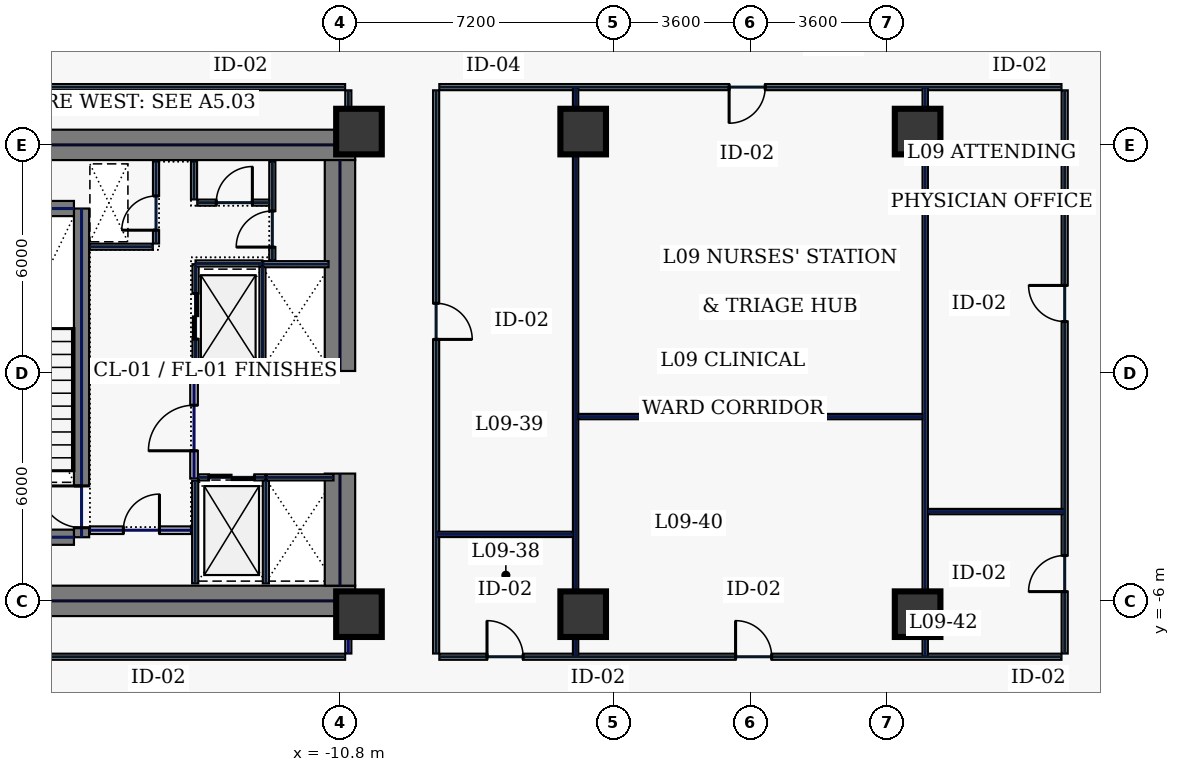
"""IFC4 building model, lengths in metres.
Left out: names, types, materials, properties, quantities, classifications, styles, units other than length and angle.
Written with IfcOpenShell. Run it as: python <this file> out.ifc"""

import sys

from ifc_helpers import new_model, si_unit, direction, frame, frame_2d, origin, origin_2d, place, context, subcontext, project, spatial, rectangle, hollow_rectangle, extrude, element, fill, save


model = new_model("IFC4")
c1 = context("Model", 3, precision=1e-05, world=origin(), true_north=direction((0.0, 1.0)))
c2 = subcontext(c1, "Body", "Model", "MODEL_VIEW")
j1 = project(units=[si_unit("LENGTHUNIT", "METRE"), si_unit("PLANEANGLEUNIT", "RADIAN")], contexts=[c1])
p1 = place(None, origin())
s1 = spatial("IfcSite", under=j1, at=p1, CompositionType="ELEMENT")
p2 = place(p1, origin())
s2 = spatial("IfcBuilding", under=s1, at=p2, CompositionType="ELEMENT")
p3 = place(p2, frame((0.0, 0.0, 47.4)))
s3 = spatial("IfcBuildingStorey", under=s2, at=p3, CompositionType="ELEMENT", Elevation=47.4)
for number, where, z_axis, x_axis in (
    (1, (-22.0, 6.0, 0.0), (0.0, 0.0, 1.0), (1.0, 0.0, 0.0)),
    (2, (-22.0, -6.0, 0.0), (0.0, 0.0, 1.0), (1.0, 0.0, 0.0)),
):
    element("IfcWall", number, at=place(p3, frame(where, z_axis=z_axis, x_axis=x_axis)), inside=s3, PredefinedType="SHEAR", context=c2, shape_type="SweptSolid", body=[
        extrude(rectangle(XDim=11.6, YDim=0.8, at=frame_2d((5.8, 0.0))), origin(), (0.0, 0.0, 1.0), 3.74),
    ])
p4 = place(p3, frame((-10.8, -5.6, 0.0), z_axis=(0.0, 0.0, 1.0), x_axis=(0.0, 1.0, 0.0)))
e3 = element("IfcWall", 3, at=p4, inside=s3, PredefinedType="SHEAR", context=c2, shape_type="SweptSolid", body=[
    extrude(rectangle(XDim=2.95, YDim=0.8, at=frame_2d((1.475, 0.0))), origin(), (0.0, 0.0, 1.0), 3.74),
])
p5 = place(p3, frame((-10.8, 0.05, 0.0), z_axis=(0.0, 0.0, 1.0), x_axis=(0.0, 1.0, 0.0)))
e4 = element("IfcWall", 4, at=p5, inside=s3, PredefinedType="SHEAR", context=c2, shape_type="SweptSolid", body=[
    extrude(rectangle(XDim=5.55, YDim=0.8, at=frame_2d((2.775, 0.0))), origin(), (0.0, 0.0, 1.0), 3.74),
])
p6 = place(p3, frame((-17.6, -4.325, 0.0), z_axis=(0.0, 0.0, 1.0), x_axis=(0.0, 1.0, 0.0)))
e5 = element("IfcWall", 5, at=p6, inside=s3, PredefinedType="SHEAR", context=c2, shape_type="SweptSolid", body=[
    extrude(rectangle(XDim=8.65, YDim=0.4, at=frame_2d((4.325, 0.0))), origin(), (0.0, 0.0, 1.0), 3.74),
])
p7 = place(p6, frame((0.25, 0.0, 0.0)))
e6 = element("IfcOpeningElement", 6, at=p7, cuts=e5, PredefinedType="OPENING", context=c2, shape_type="SweptSolid", body=[
    extrude(rectangle(XDim=1.1, YDim=2.2, at=frame_2d((0.55, 1.1))), frame((0.0, 0.21, 0.0), z_axis=(0.0, -1.0, 0.0), x_axis=(1.0, 0.0, 0.0)), (0.0, 0.0, 1.0), 0.42),
])
for number, where, z_axis, x_axis in (
    (7, (-21.2, -4.325, 0.0), (0.0, 0.0, 1.0), (1.0, 0.0, 0.0)),
    (8, (-21.2, 4.325, 0.0), (0.0, 0.0, 1.0), (1.0, 0.0, 0.0)),
):
    element("IfcWall", number, at=place(p3, frame(where, z_axis=z_axis, x_axis=x_axis)), inside=s3, PredefinedType="SHEAR", context=c2, shape_type="SweptSolid", body=[
        extrude(rectangle(XDim=3.4, YDim=0.4, at=frame_2d((1.7, 0.0))), origin(), (0.0, 0.0, 1.0), 3.74),
    ])
for number, where, z_axis, x_axis in (
    (9, (-10.3, -6.35, 0.0), (0.0, 0.0, 1.0), (1.0, 0.0, 0.0)),
    (10, (-10.3, 6.35, 0.0), (0.0, 0.0, 1.0), (1.0, 0.0, 0.0)),
    (11, (-4.4, -6.35, 0.0), (0.0, 0.0, 1.0), (1.0, 0.0, 0.0)),
    (12, (4.4, -6.35, 0.0), (0.0, 0.0, 1.0), (1.0, 0.0, 0.0)),
    (13, (-4.4, 6.35, 0.0), (0.0, 0.0, 1.0), (1.0, 0.0, 0.0)),
    (14, (4.4, 6.35, 0.0), (0.0, 0.0, 1.0), (1.0, 0.0, 0.0)),
):
    element("IfcColumn", number, at=place(p3, frame(where, z_axis=z_axis, x_axis=x_axis)), inside=s3, PredefinedType="COLUMN", context=c2, shape_type="SweptSolid", body=[
        extrude(hollow_rectangle(XDim=1.2, YDim=1.2, WallThickness=0.05, at=origin_2d()), origin(), (0.0, 0.0, 1.0), 3.74),
    ])
p8 = place(p3, frame((-14.6, 0.12, 0.0), z_axis=(0.0, 0.0, 1.0), x_axis=(0.0, 1.0, 0.0)))
e15 = element("IfcWall", 15, at=p8, inside=s3, PredefinedType="PARTITIONING", context=c2, shape_type="SweptSolid", body=[
    extrude(rectangle(XDim=2.74, YDim=0.16, at=frame_2d((1.37, 0.0))), origin(), (0.0, 0.0, 1.0), 3.74),
])
p9 = place(p8, frame((0.77, 0.0, 0.0)))
e16 = element("IfcOpeningElement", 16, at=p9, cuts=e15, PredefinedType="OPENING", context=c2, shape_type="SweptSolid", body=[
    extrude(rectangle(XDim=1.2, YDim=2.2, at=frame_2d((0.6, 1.1))), frame((0.0, 0.09, 0.0), z_axis=(0.0, -1.0, 0.0), x_axis=(1.0, 0.0, 0.0)), (0.0, 0.0, 1.0), 0.18),
])
for number, where, z_axis, x_axis in (
    (17, (-14.6, 0.1, 0.0), (0.0, 0.0, 1.0), (1.0, 0.0, 0.0)),
    (18, (-14.6, 2.88, 0.0), (0.0, 0.0, 1.0), (1.0, 0.0, 0.0)),
):
    element("IfcWall", number, at=place(p3, frame(where, z_axis=z_axis, x_axis=x_axis)), inside=s3, PredefinedType="PARTITIONING", context=c2, shape_type="SweptSolid", body=[
        extrude(rectangle(XDim=1.76, YDim=0.16, at=frame_2d((0.88, 0.0))), origin(), (0.0, 0.0, 1.0), 3.74),
    ])
p10 = place(p3, frame((-12.84, 0.18, 0.0), z_axis=(0.0, 0.0, 1.0), x_axis=(0.0, 1.0, 0.0)))
e19 = element("IfcWall", 19, at=p10, inside=s3, PredefinedType="PARTITIONING", context=c2, shape_type="SweptSolid", body=[
    extrude(rectangle(XDim=2.62, YDim=0.16, at=frame_2d((1.31, 0.0))), origin(), (0.0, 0.0, 1.0), 3.74),
])
p11 = place(p3, frame((-14.53, -2.75, 0.0), z_axis=(0.0, 0.0, 1.0), x_axis=(1.0, 0.0, 0.0)))
e20 = element("IfcWall", 20, at=p11, inside=s3, PredefinedType="PARTITIONING", context=c2, shape_type="SweptSolid", body=[
    extrude(rectangle(XDim=1.76, YDim=0.16, at=frame_2d((0.88, 0.0))), origin(), (0.0, 0.0, 1.0), 3.74),
])
p12 = place(p11, frame((0.28, 0.0, 0.0)))
e21 = element("IfcOpeningElement", 21, at=p12, cuts=e20, PredefinedType="OPENING", context=c2, shape_type="SweptSolid", body=[
    extrude(rectangle(XDim=1.2, YDim=2.2, at=frame_2d((0.6, 1.1))), frame((0.0, 0.09, 0.0), z_axis=(0.0, -1.0, 0.0), x_axis=(1.0, 0.0, 0.0)), (0.0, 0.0, 1.0), 0.18),
])
for number, where, z_axis, x_axis in (
    (22, (-12.75, -5.54, 0.0), (0.0, 0.0, 1.0), (0.0, 1.0, 0.0)),
    (23, (-14.61, -5.54, 0.0), (0.0, 0.0, 1.0), (0.0, 1.0, 0.0)),
):
    element("IfcWall", number, at=place(p3, frame(where, z_axis=z_axis, x_axis=x_axis)), inside=s3, PredefinedType="PARTITIONING", context=c2, shape_type="SweptSolid", body=[
        extrude(rectangle(XDim=2.7, YDim=0.16, at=frame_2d((1.35, 0.0))), origin(), (0.0, 0.0, 1.0), 3.74),
    ])
p13 = place(p3, frame((-12.73, -2.75, 0.0), z_axis=(0.0, 0.0, 1.0), x_axis=(1.0, 0.0, 0.0)))
e24 = element("IfcWall", 24, at=p13, inside=s3, PredefinedType="PARTITIONING", context=c2, shape_type="SweptSolid", body=[
    extrude(rectangle(XDim=1.76, YDim=0.16, at=frame_2d((0.88, 0.0))), origin(), (0.0, 0.0, 1.0), 3.74),
])
for number, where, z_axis, x_axis in (
    (25, (-12.82, 0.06, 0.0), (0.0, 0.0, 1.0), (1.0, 0.0, 0.0)),
    (26, (-12.82, 2.86, 0.0), (0.0, 0.0, 1.0), (1.0, 0.0, 0.0)),
):
    element("IfcWall", number, at=place(p3, frame(where, z_axis=z_axis, x_axis=x_axis)), inside=s3, PredefinedType="PARTITIONING", context=c2, shape_type="SweptSolid", body=[
        extrude(rectangle(XDim=1.72, YDim=0.16, at=frame_2d((0.86, 0.0))), origin(), (0.0, 0.0, 1.0), 3.74),
    ])
p14 = place(p3, frame((-15.64, 3.405, 0.0), z_axis=(0.0, 0.0, 1.0), x_axis=(0.0, 1.0, 0.0)))
e27 = element("IfcWall", 27, at=p14, inside=s3, PredefinedType="PARTITIONING", context=c2, shape_type="SweptSolid", body=[
    extrude(rectangle(XDim=2.155, YDim=0.16, at=frame_2d((1.078, 0.0))), origin(), (0.0, 0.0, 1.0), 3.74),
])
p15 = place(p14, frame((0.35, 0.0, 0.0)))
e28 = element("IfcOpeningElement", 28, at=p15, cuts=e27, PredefinedType="OPENING", context=c2, shape_type="SweptSolid", body=[
    extrude(rectangle(XDim=0.9, YDim=2.2, at=frame_2d((0.45, 1.1))), frame((0.0, 0.09, 0.0), z_axis=(0.0, -1.0, 0.0), x_axis=(1.0, 0.0, 0.0)), (0.0, 0.0, 1.0), 0.18),
])
p16 = place(p3, frame((-17.38, 3.32, 0.0), z_axis=(0.0, 0.0, 1.0), x_axis=(1.0, 0.0, 0.0)))
e29 = element("IfcWall", 29, at=p16, inside=s3, PredefinedType="PARTITIONING", context=c2, shape_type="SweptSolid", body=[
    extrude(rectangle(XDim=1.655, YDim=0.16, at=frame_2d((0.827, 0.0))), origin(), (0.0, 0.0, 1.0), 3.74),
])
p17 = place(p3, frame((-17.38, -4.14, 0.0), z_axis=(0.0, 0.0, 1.0), x_axis=(1.0, 0.0, 0.0)))
e30 = element("IfcWall", 30, at=p17, inside=s3, PredefinedType="SOLIDWALL", context=c2, shape_type="SweptSolid", body=[
    extrude(rectangle(XDim=2.66, YDim=0.2, at=frame_2d((1.33, 0.0))), origin(), (0.0, 0.0, 1.0), 3.74),
])
p18 = place(p17, frame((0.88, 0.0, 0.0)))
e31 = element("IfcOpeningElement", 31, at=p18, cuts=e30, PredefinedType="OPENING", context=c2, shape_type="SweptSolid", body=[
    extrude(rectangle(XDim=0.95, YDim=2.2, at=frame_2d((0.475, 1.1))), frame((0.0, 0.11, 0.0), z_axis=(0.0, -1.0, 0.0), x_axis=(1.0, 0.0, 0.0)), (0.0, 0.0, 1.0), 0.22),
])
p19 = place(p3, frame((-12.58, 2.96, 0.0), z_axis=(0.0, 0.0, 1.0), x_axis=(0.0, 1.0, 0.0)))
e32 = element("IfcWall", 32, at=p19, inside=s3, PredefinedType="PARTITIONING", context=c2, shape_type="SweptSolid", body=[
    extrude(rectangle(XDim=2.6, YDim=0.16, at=frame_2d((1.3, 0.0))), origin(), (0.0, 0.0, 1.0), 3.74),
])
p20 = place(p19, frame((0.35, 0.0, 0.0)))
e33 = element("IfcOpeningElement", 33, at=p20, cuts=e32, PredefinedType="OPENING", context=c2, shape_type="SweptSolid", body=[
    extrude(rectangle(XDim=0.95, YDim=2.2, at=frame_2d((0.475, 1.1))), frame((0.0, 0.09, 0.0), z_axis=(0.0, -1.0, 0.0), x_axis=(1.0, 0.0, 0.0)), (0.0, 0.0, 1.0), 0.18),
])
p21 = place(p3, frame((-14.555, 4.48, 0.0), z_axis=(0.0, 0.0, 1.0), x_axis=(1.0, 0.0, 0.0)))
e34 = element("IfcWall", 34, at=p21, inside=s3, PredefinedType="PARTITIONING", context=c2, shape_type="SweptSolid", body=[
    extrude(rectangle(XDim=1.89, YDim=0.16, at=frame_2d((0.945, 0.0))), origin(), (0.0, 0.0, 1.0), 3.74),
])
p22 = place(p21, frame((0.5, 0.0, 0.0)))
e35 = element("IfcOpeningElement", 35, at=p22, cuts=e34, PredefinedType="OPENING", context=c2, shape_type="SweptSolid", body=[
    extrude(rectangle(XDim=0.95, YDim=2.2, at=frame_2d((0.475, 1.1))), frame((0.0, 0.09, 0.0), z_axis=(0.0, -1.0, 0.0), x_axis=(1.0, 0.0, 0.0)), (0.0, 0.0, 1.0), 0.18),
])
p23 = place(p3, frame((-14.64, 4.565, 0.0), z_axis=(0.0, 0.0, 1.0), x_axis=(0.0, 1.0, 0.0)))
e36 = element("IfcWall", 36, at=p23, inside=s3, PredefinedType="PARTITIONING", context=c2, shape_type="SweptSolid", body=[
    extrude(rectangle(XDim=0.995, YDim=0.16, at=frame_2d((0.498, 0.0))), origin(), (0.0, 0.0, 1.0), 3.74),
])
p24 = place(p3, frame((-14.64, -2.78, 0.0), z_axis=(0.0, 0.0, 1.0), x_axis=(0.0, 1.0, 0.0)))
e37 = element("IfcWall", 37, at=p24, inside=s3, PredefinedType="SOLIDWALL", context=c2, shape_type="SweptSolid", body=[
    extrude(rectangle(XDim=2.82, YDim=0.2, at=frame_2d((1.41, 0.0))), origin(), (0.0, 0.0, 1.0), 3.74),
])
p25 = place(p24, frame((0.73, 0.0, 0.0)))
e38 = element("IfcOpeningElement", 38, at=p25, cuts=e37, PredefinedType="OPENING", context=c2, shape_type="SweptSolid", body=[
    extrude(rectangle(XDim=1.2, YDim=2.2, at=frame_2d((0.6, 1.1))), frame((0.0, 0.11, 0.0), z_axis=(0.0, -1.0, 0.0), x_axis=(1.0, 0.0, 0.0)), (0.0, 0.0, 1.0), 0.22),
])
p26 = place(p3, frame((8.185, 7.52, 0.0), z_axis=(0.0, 0.0, 1.0), x_axis=(-1.0, 0.0, 0.0)))
e39 = element("IfcWall", 39, at=p26, inside=s3, PredefinedType="PARTITIONING", context=c2, shape_type="SweptSolid", body=[
    extrude(rectangle(XDim=16.37, YDim=0.16, at=frame_2d((8.185, 0.0))), origin(), (0.0, 0.0, 1.0), 3.74),
])
p27 = place(p26, frame((7.795, 0.0, 0.0)))
e40 = element("IfcOpeningElement", 40, at=p27, cuts=e39, PredefinedType="OPENING", context=c2, shape_type="SweptSolid", body=[
    extrude(rectangle(XDim=0.95, YDim=2.2, at=frame_2d((0.475, 1.1))), frame((0.0, 0.09, 0.0), z_axis=(0.0, -1.0, 0.0), x_axis=(1.0, 0.0, 0.0)), (0.0, 0.0, 1.0), 0.18),
])
p28 = place(p3, frame((-8.27, 7.435, 0.0), z_axis=(0.0, 0.0, 1.0), x_axis=(0.0, -1.0, 0.0)))
e41 = element("IfcWall", 41, at=p28, inside=s3, PredefinedType="PARTITIONING", context=c2, shape_type="SweptSolid", body=[
    extrude(rectangle(XDim=14.82, YDim=0.16, at=frame_2d((7.41, 0.0))), origin(), (0.0, 0.0, 1.0), 3.74),
])
p29 = place(p28, frame((5.604, 0.0, 0.0)))
e42 = element("IfcOpeningElement", 42, at=p29, cuts=e41, PredefinedType="OPENING", context=c2, shape_type="SweptSolid", body=[
    extrude(rectangle(XDim=0.95, YDim=2.2, at=frame_2d((0.475, 1.1))), frame((0.0, 0.09, 0.0), z_axis=(0.0, -1.0, 0.0), x_axis=(1.0, 0.0, 0.0)), (0.0, 0.0, 1.0), 0.18),
])
p30 = place(p3, frame((-8.185, -7.47, 0.0), z_axis=(0.0, 0.0, 1.0), x_axis=(1.0, 0.0, 0.0)))
e43 = element("IfcWall", 43, at=p30, inside=s3, PredefinedType="PARTITIONING", context=c2, shape_type="SweptSolid", body=[
    extrude(rectangle(XDim=16.37, YDim=0.16, at=frame_2d((8.185, 0.0))), origin(), (0.0, 0.0, 1.0), 3.74),
])
p31 = place(p30, frame((1.254, 0.0, 0.0)))
e44 = element("IfcOpeningElement", 44, at=p31, cuts=e43, PredefinedType="OPENING", context=c2, shape_type="SweptSolid", body=[
    extrude(rectangle(XDim=0.95, YDim=2.2, at=frame_2d((0.475, 1.1))), frame((0.0, 0.09, 0.0), z_axis=(0.0, -1.0, 0.0), x_axis=(1.0, 0.0, 0.0)), (0.0, 0.0, 1.0), 0.18),
])
p32 = place(p30, frame((7.795, 0.0, 0.0)))
e45 = element("IfcOpeningElement", 45, at=p32, cuts=e43, PredefinedType="OPENING", context=c2, shape_type="SweptSolid", body=[
    extrude(rectangle(XDim=0.95, YDim=2.2, at=frame_2d((0.475, 1.1))), frame((0.0, 0.09, 0.0), z_axis=(0.0, -1.0, 0.0), x_axis=(1.0, 0.0, 0.0)), (0.0, 0.0, 1.0), 0.18),
])
p33 = place(p3, frame((8.27, -7.385, 0.0), z_axis=(0.0, 0.0, 1.0), x_axis=(0.0, 1.0, 0.0)))
e46 = element("IfcWall", 46, at=p33, inside=s3, PredefinedType="PARTITIONING", context=c2, shape_type="SweptSolid", body=[
    extrude(rectangle(XDim=14.82, YDim=0.16, at=frame_2d((7.41, 0.0))), origin(), (0.0, 0.0, 1.0), 3.74),
])
p34 = place(p33, frame((1.629, 0.0, 0.0)))
e47 = element("IfcOpeningElement", 47, at=p34, cuts=e46, PredefinedType="OPENING", context=c2, shape_type="SweptSolid", body=[
    extrude(rectangle(XDim=0.95, YDim=2.2, at=frame_2d((0.475, 1.1))), frame((0.0, 0.09, 0.0), z_axis=(0.0, -1.0, 0.0), x_axis=(1.0, 0.0, 0.0)), (0.0, 0.0, 1.0), 0.18),
])
p35 = place(p33, frame((8.736, 0.0, 0.0)))
e48 = element("IfcOpeningElement", 48, at=p35, cuts=e46, PredefinedType="OPENING", context=c2, shape_type="SweptSolid", body=[
    extrude(rectangle(XDim=0.95, YDim=2.2, at=frame_2d((0.475, 1.1))), frame((0.0, 0.09, 0.0), z_axis=(0.0, -1.0, 0.0), x_axis=(1.0, 0.0, 0.0)), (0.0, 0.0, 1.0), 0.18),
])
p36 = place(p3, frame((-10.58, -7.385, 0.0), z_axis=(0.0, 0.0, 1.0), x_axis=(0.0, 1.0, 0.0)))
e49 = element("IfcWall", 49, at=p36, inside=s3, PredefinedType="PARTITIONING", context=c2, shape_type="SweptSolid", body=[
    extrude(rectangle(XDim=0.965, YDim=0.16, at=frame_2d((0.482, 0.0))), origin(), (0.0, 0.0, 1.0), 1.535),
])
p37 = place(p3, frame((-10.58, 6.42, 0.0), z_axis=(0.0, 0.0, 1.0), x_axis=(0.0, 1.0, 0.0)))
e50 = element("IfcWall", 50, at=p37, inside=s3, PredefinedType="PARTITIONING", context=c2, shape_type="SweptSolid", body=[
    extrude(rectangle(XDim=1.015, YDim=0.16, at=frame_2d((0.508, 0.0))), origin(), (0.0, 0.0, 1.0), 3.74),
])
for number, where, z_axis, x_axis in (
    (51, (-10.665, 7.52, 0.0), (0.0, 0.0, 1.0), (-1.0, 0.0, 0.0)),
    (52, (-27.185, -7.47, 0.0), (0.0, 0.0, 1.0), (1.0, 0.0, 0.0)),
):
    element("IfcWall", number, at=place(p3, frame(where, z_axis=z_axis, x_axis=x_axis)), inside=s3, PredefinedType="PARTITIONING", context=c2, shape_type="SweptSolid", body=[
        extrude(rectangle(XDim=16.52, YDim=0.16, at=frame_2d((8.26, 0.0))), origin(), (0.0, 0.0, 1.0), 3.74),
    ])
for number, where, z_axis, x_axis in (
    (53, (-4.6, -7.465, 0.0), (0.0, 0.0, 1.0), (0.0, 1.0, 0.0)),
    (54, (4.6, -7.465, 0.0), (0.0, 0.0, 1.0), (0.0, 1.0, 0.0)),
):
    element("IfcWall", number, at=place(p3, frame(where, z_axis=z_axis, x_axis=x_axis)), inside=s3, PredefinedType="PARTITIONING", context=c2, shape_type="SweptSolid", body=[
        extrude(rectangle(XDim=14.98, YDim=0.14, at=frame_2d((7.49, 0.0))), origin(), (0.0, 0.0, 1.0), 2.935),
    ])
p38 = place(p3, frame((-4.525, -1.15, 0.0), z_axis=(0.0, 0.0, 1.0), x_axis=(1.0, 0.0, 0.0)))
e55 = element("IfcWall", 55, at=p38, inside=s3, PredefinedType="PARTITIONING", context=c2, shape_type="SweptSolid", body=[
    extrude(rectangle(XDim=9.05, YDim=0.14, at=frame_2d((4.525, 0.0))), origin(), (0.0, 0.0, 1.0), 3.74),
])
for number, where, z_axis, x_axis in (
    (56, (-8.265, -4.25, 0.0), (0.0, 0.0, 1.0), (1.0, 0.0, 0.0)),
    (57, (4.675, -3.65, 0.0), (0.0, 0.0, 1.0), (1.0, 0.0, 0.0)),
):
    element("IfcWall", number, at=place(p3, frame(where, z_axis=z_axis, x_axis=x_axis)), inside=s3, PredefinedType="PARTITIONING", context=c2, shape_type="SweptSolid", body=[
        extrude(rectangle(XDim=3.59, YDim=0.14, at=frame_2d((1.795, 0.0))), origin(), (0.0, 0.0, 1.0), 3.74),
    ])
p39 = place(p7, origin())
e58 = element("IfcDoor", 58, at=p39, inside=s3, OperationType="SINGLE_SWING_RIGHT", PredefinedType="DOOR", context=c2, shape_type="SweptSolid", body=[
    extrude(rectangle(XDim=1.1, YDim=2.2, at=frame_2d((0.55, 1.1))), frame((0.0, 0.025, 0.0), z_axis=(0.0, -1.0, 0.0), x_axis=(1.0, 0.0, 0.0)), (0.0, 0.0, 1.0), 0.05),
])
fill(e6, e58)
p40 = place(p9, origin())
e59 = element("IfcDoor", 59, at=p40, inside=s3, OperationType="SLIDING_TO_LEFT", PredefinedType="DOOR", context=c2, shape_type="SweptSolid", body=[
    extrude(rectangle(XDim=1.2, YDim=2.2, at=frame_2d((0.6, 1.1))), frame((0.0, 0.025, 0.0), z_axis=(0.0, -1.0, 0.0), x_axis=(1.0, 0.0, 0.0)), (0.0, 0.0, 1.0), 0.05),
])
fill(e16, e59)
p41 = place(p12, origin())
e60 = element("IfcDoor", 60, at=p41, inside=s3, OperationType="SLIDING_TO_LEFT", PredefinedType="DOOR", context=c2, shape_type="SweptSolid", body=[
    extrude(rectangle(XDim=1.2, YDim=2.2, at=frame_2d((0.6, 1.1))), frame((0.0, 0.025, 0.0), z_axis=(0.0, -1.0, 0.0), x_axis=(1.0, 0.0, 0.0)), (0.0, 0.0, 1.0), 0.05),
])
fill(e21, e60)
p42 = place(p15, origin())
e61 = element("IfcDoor", 61, at=p42, inside=s3, OperationType="SINGLE_SWING_LEFT", PredefinedType="DOOR", context=c2, shape_type="SweptSolid", body=[
    extrude(rectangle(XDim=0.9, YDim=2.2, at=frame_2d((0.45, 1.1))), frame((0.0, 0.025, 0.0), z_axis=(0.0, -1.0, 0.0), x_axis=(1.0, 0.0, 0.0)), (0.0, 0.0, 1.0), 0.05),
])
fill(e28, e61)
p43 = place(p18, origin())
e62 = element("IfcDoor", 62, at=p43, inside=s3, OperationType="SINGLE_SWING_RIGHT", PredefinedType="DOOR", context=c2, shape_type="SweptSolid", body=[
    extrude(rectangle(XDim=0.95, YDim=2.2, at=frame_2d((0.475, 1.1))), frame((0.0, 0.025, 0.0), z_axis=(0.0, -1.0, 0.0), x_axis=(1.0, 0.0, 0.0)), (0.0, 0.0, 1.0), 0.05),
])
fill(e31, e62)
p44 = place(p20, origin())
e63 = element("IfcDoor", 63, at=p44, inside=s3, OperationType="SINGLE_SWING_LEFT", PredefinedType="DOOR", context=c2, shape_type="SweptSolid", body=[
    extrude(rectangle(XDim=0.95, YDim=2.2, at=frame_2d((0.475, 1.1))), frame((0.0, 0.025, 0.0), z_axis=(0.0, -1.0, 0.0), x_axis=(1.0, 0.0, 0.0)), (0.0, 0.0, 1.0), 0.05),
])
fill(e33, e63)
p45 = place(p22, origin())
e64 = element("IfcDoor", 64, at=p45, inside=s3, OperationType="SINGLE_SWING_RIGHT", PredefinedType="DOOR", context=c2, shape_type="SweptSolid", body=[
    extrude(rectangle(XDim=0.95, YDim=2.2, at=frame_2d((0.475, 1.1))), frame((0.0, 0.025, 0.0), z_axis=(0.0, -1.0, 0.0), x_axis=(1.0, 0.0, 0.0)), (0.0, 0.0, 1.0), 0.05),
])
fill(e35, e64)
p46 = place(p25, origin())
e65 = element("IfcDoor", 65, at=p46, inside=s3, OperationType="SINGLE_SWING_LEFT", PredefinedType="DOOR", context=c2, shape_type="SweptSolid", body=[
    extrude(rectangle(XDim=1.2, YDim=2.2, at=frame_2d((0.6, 1.1))), frame((0.0, 0.025, 0.0), z_axis=(0.0, -1.0, 0.0), x_axis=(1.0, 0.0, 0.0)), (0.0, 0.0, 1.0), 0.05),
])
fill(e38, e65)
p47 = place(p31, origin())
e66 = element("IfcDoor", 66, at=p47, inside=s3, OperationType="SINGLE_SWING_LEFT", PredefinedType="DOOR", context=c2, shape_type="SweptSolid", body=[
    extrude(rectangle(XDim=0.95, YDim=2.2, at=frame_2d((0.475, 1.1))), frame((0.0, 0.025, 0.0), z_axis=(0.0, -1.0, 0.0), x_axis=(1.0, 0.0, 0.0)), (0.0, 0.0, 1.0), 0.05),
])
fill(e44, e66)
p48 = place(p29, origin())
e67 = element("IfcDoor", 67, at=p48, inside=s3, OperationType="SINGLE_SWING_RIGHT", PredefinedType="DOOR", context=c2, shape_type="SweptSolid", body=[
    extrude(rectangle(XDim=0.95, YDim=2.2, at=frame_2d((0.475, 1.1))), frame((0.0, 0.025, 0.0), z_axis=(0.0, -1.0, 0.0), x_axis=(1.0, 0.0, 0.0)), (0.0, 0.0, 1.0), 0.05),
])
fill(e42, e67)
p49 = place(p32, origin())
e68 = element("IfcDoor", 68, at=p49, inside=s3, OperationType="SINGLE_SWING_LEFT", PredefinedType="DOOR", context=c2, shape_type="SweptSolid", body=[
    extrude(rectangle(XDim=0.95, YDim=2.2, at=frame_2d((0.475, 1.1))), frame((0.0, 0.025, 0.0), z_axis=(0.0, -1.0, 0.0), x_axis=(1.0, 0.0, 0.0)), (0.0, 0.0, 1.0), 0.05),
])
fill(e45, e68)
p50 = place(p27, origin())
e69 = element("IfcDoor", 69, at=p50, inside=s3, OperationType="SINGLE_SWING_RIGHT", PredefinedType="DOOR", context=c2, shape_type="SweptSolid", body=[
    extrude(rectangle(XDim=0.95, YDim=2.2, at=frame_2d((0.475, 1.1))), frame((0.0, 0.025, 0.0), z_axis=(0.0, -1.0, 0.0), x_axis=(1.0, 0.0, 0.0)), (0.0, 0.0, 1.0), 0.05),
])
fill(e40, e69)
p51 = place(p34, origin())
e70 = element("IfcDoor", 70, at=p51, inside=s3, OperationType="SINGLE_SWING_LEFT", PredefinedType="DOOR", context=c2, shape_type="SweptSolid", body=[
    extrude(rectangle(XDim=0.95, YDim=2.2, at=frame_2d((0.475, 1.1))), frame((0.0, 0.025, 0.0), z_axis=(0.0, -1.0, 0.0), x_axis=(1.0, 0.0, 0.0)), (0.0, 0.0, 1.0), 0.05),
])
fill(e47, e70)
p52 = place(p35, origin())
e71 = element("IfcDoor", 71, at=p52, inside=s3, OperationType="SINGLE_SWING_RIGHT", PredefinedType="DOOR", context=c2, shape_type="SweptSolid", body=[
    extrude(rectangle(XDim=0.95, YDim=2.2, at=frame_2d((0.475, 1.1))), frame((0.0, 0.025, 0.0), z_axis=(0.0, -1.0, 0.0), x_axis=(1.0, 0.0, 0.0)), (0.0, 0.0, 1.0), 0.05),
])
fill(e48, e71)
save(model, sys.argv[1])
